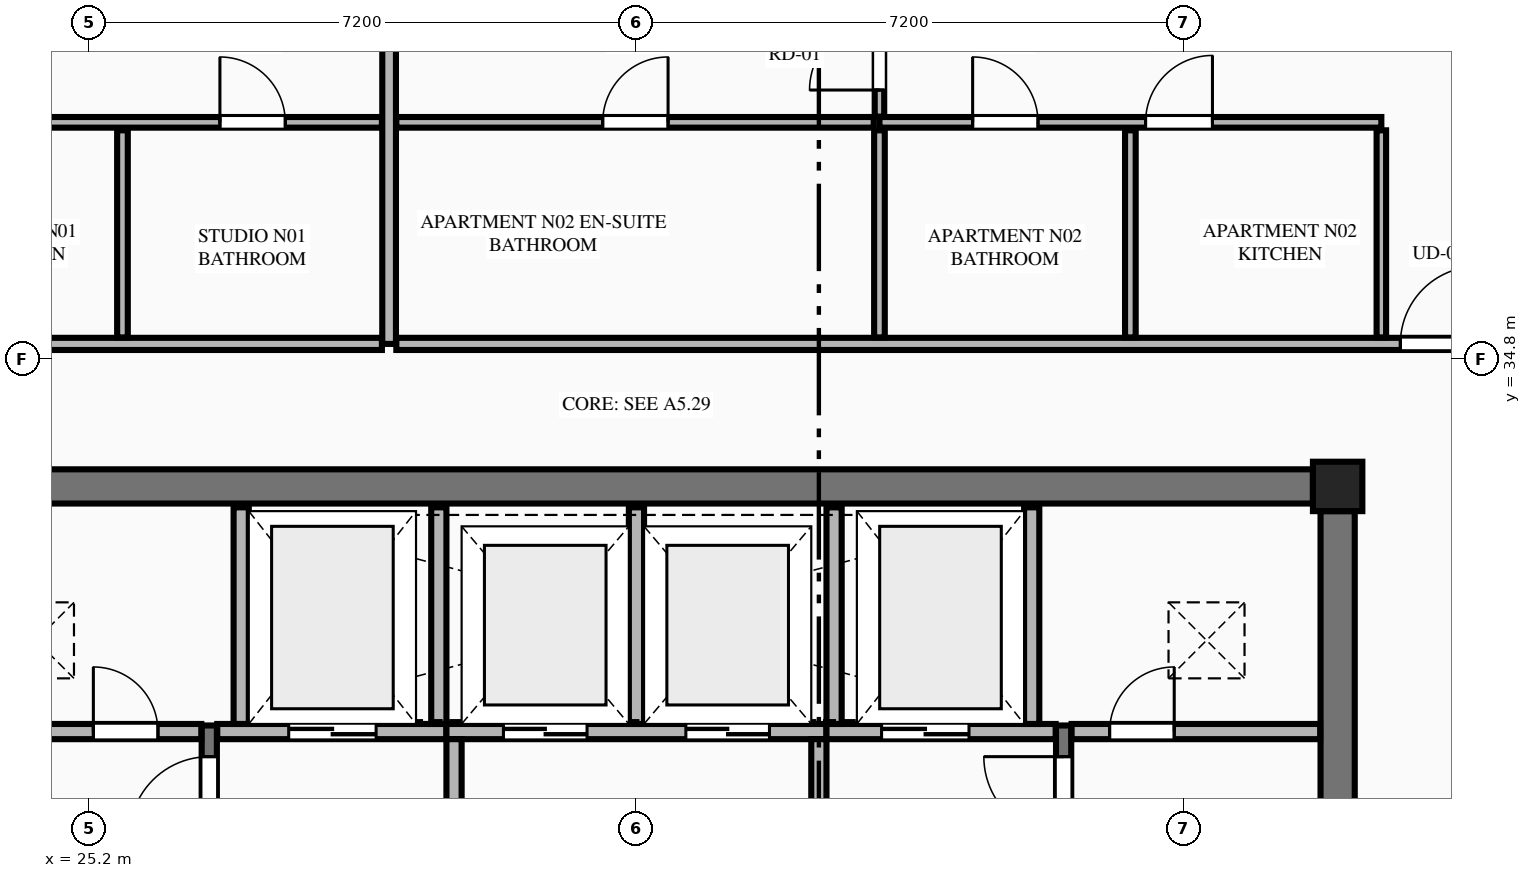
"""IFC4 building model, lengths in metres.
Left out: names, types, materials, properties, quantities, classifications, styles, units other than length and angle.
Written with IfcOpenShell. Run it as: python <this file> out.ifc"""

import sys

from ifc_helpers import new_model, si_unit, direction, frame, frame_2d, origin, origin_2d, place, context, subcontext, project, spatial, rectangle, extrude, element, fill, save


model = new_model("IFC4")
c1 = context("Model", 3, precision=1e-05, world=origin(), true_north=direction((0.0, 1.0)))
c2 = subcontext(c1, "Body", "Model", "MODEL_VIEW")
j1 = project(units=[si_unit("LENGTHUNIT", "METRE"), si_unit("PLANEANGLEUNIT", "RADIAN")], contexts=[c1])
p1 = place(None, origin())
s1 = spatial("IfcSite", under=j1, at=p1, CompositionType="ELEMENT")
p2 = place(p1, origin())
s2 = spatial("IfcBuilding", under=s1, at=p2, CompositionType="ELEMENT")
p3 = place(p2, frame((0.0, 0.0, 287.5)))
s3 = spatial("IfcBuildingStorey", under=s2, at=p3, CompositionType="ELEMENT", Elevation=287.5)
p4 = place(p3, frame((41.625, 33.125, 0.0), z_axis=(0.0, 0.0, 1.0), x_axis=(1.0, 0.0, 0.0)))
e1 = element("IfcColumn", 1, at=p4, inside=s3, PredefinedType="COLUMN", context=c2, shape_type="SweptSolid", body=[
    extrude(rectangle(XDim=0.65, YDim=0.65, at=origin_2d()), origin(), (0.0, 0.0, 1.0), 4.0),
])
p5 = place(p3, frame((23.5, 33.125, 0.0), z_axis=(0.0, 0.0, 1.0), x_axis=(1.0, 0.0, 0.0)))
e2 = element("IfcWall", 2, at=p5, inside=s3, PredefinedType="SHEAR", context=c2, shape_type="SweptSolid", body=[
    extrude(rectangle(XDim=17.8, YDim=0.45, at=frame_2d((8.9, 0.0))), origin(), (0.0, 0.0, 1.0), 3.8),
])
p6 = place(p3, frame((41.625, 19.0, 0.0), z_axis=(0.0, 0.0, 1.0), x_axis=(0.0, 1.0, 0.0)))
e3 = element("IfcWall", 3, at=p6, inside=s3, PredefinedType="SHEAR", context=c2, shape_type="SweptSolid", body=[
    extrude(rectangle(XDim=13.8, YDim=0.45, at=frame_2d((6.9, 0.0))), origin(), (0.0, 0.0, 1.0), 3.8),
])
p7 = place(p6, frame((2.84, 0.0, 0.0)))
e4 = element("IfcOpeningElement", 4, at=p7, cuts=e3, PredefinedType="OPENING", context=c2, shape_type="SweptSolid", body=[
    extrude(rectangle(XDim=1.22, YDim=2.25, at=frame_2d((0.61, 1.125))), frame((0.0, 0.235, 0.0), z_axis=(0.0, -1.0, 0.0), x_axis=(1.0, 0.0, 0.0)), (0.0, 0.0, 1.0), 0.47),
])
p8 = place(p3, frame((26.78, 23.2, 0.0), z_axis=(0.0, 0.0, 1.0), x_axis=(0.0, 1.0, 0.0)))
e5 = element("IfcWall", 5, at=p8, inside=s3, PredefinedType="SHEAR", context=c2, shape_type="SweptSolid", body=[
    extrude(rectangle(XDim=6.78, YDim=0.2, at=frame_2d((3.39, 0.0))), origin(), (0.0, 0.0, 1.0), 4.0),
])
p9 = place(p8, frame((5.32, 0.0, 0.0)))
e6 = element("IfcOpeningElement", 6, at=p9, cuts=e5, PredefinedType="OPENING", context=c2, shape_type="SweptSolid", body=[
    extrude(rectangle(XDim=1.05, YDim=2.15, at=frame_2d((0.525, 1.075))), frame((0.0, 0.11, 0.0), z_axis=(0.0, -1.0, 0.0), x_axis=(1.0, 0.0, 0.0)), (0.0, 0.0, 1.0), 0.22),
])
p10 = place(p3, frame((38.02, 23.2, 0.0), z_axis=(0.0, 0.0, 1.0), x_axis=(0.0, 1.0, 0.0)))
e7 = element("IfcWall", 7, at=p10, inside=s3, PredefinedType="SHEAR", context=c2, shape_type="SweptSolid", body=[
    extrude(rectangle(XDim=6.78, YDim=0.2, at=frame_2d((3.39, 0.0))), origin(), (0.0, 0.0, 1.0), 4.0),
])
p11 = place(p10, frame((5.32, 0.0, 0.0)))
e8 = element("IfcOpeningElement", 8, at=p11, cuts=e7, PredefinedType="OPENING", context=c2, shape_type="SweptSolid", body=[
    extrude(rectangle(XDim=1.05, YDim=2.15, at=frame_2d((0.525, 1.075))), frame((0.0, 0.11, 0.0), z_axis=(0.0, -1.0, 0.0), x_axis=(1.0, 0.0, 0.0)), (0.0, 0.0, 1.0), 0.22),
])
p12 = place(p3, frame((23.405, 29.9, 0.0), z_axis=(0.0, 0.0, 1.0), x_axis=(1.0, 0.0, 0.0)))
e9 = element("IfcWall", 9, at=p12, inside=s3, PredefinedType="PLUMBINGWALL", context=c2, shape_type="SweptSolid", body=[
    extrude(rectangle(XDim=3.27, YDim=0.2, at=frame_2d((1.635, 0.0))), origin(), (0.0, 0.0, 1.0), 3.8),
])
p13 = place(p12, frame((1.85, 0.0, 0.0)))
e10 = element("IfcOpeningElement", 10, at=p13, cuts=e9, PredefinedType="OPENING", context=c2, shape_type="SweptSolid", body=[
    extrude(rectangle(XDim=0.85, YDim=2.05, at=frame_2d((0.425, 1.025))), frame((0.0, 0.11, 0.0), z_axis=(0.0, -1.0, 0.0), x_axis=(1.0, 0.0, 0.0)), (0.0, 0.0, 1.0), 0.22),
])
p14 = place(p3, frame((26.885, 29.9, 0.0), z_axis=(0.0, 0.0, 1.0), x_axis=(1.0, 0.0, 0.0)))
e11 = element("IfcWall", 11, at=p14, inside=s3, PredefinedType="PLUMBINGWALL", context=c2, shape_type="SweptSolid", body=[
    extrude(rectangle(XDim=3.015, YDim=0.2, at=frame_2d((1.507, 0.0))), origin(), (0.0, 0.0, 1.0), 3.8),
])
p15 = place(p14, frame((0.94, 0.0, 0.0)))
e12 = element("IfcOpeningElement", 12, at=p15, cuts=e11, PredefinedType="OPENING", context=c2, shape_type="SweptSolid", body=[
    extrude(rectangle(XDim=1.15, YDim=2.2, at=frame_2d((0.575, 1.1))), frame((0.0, 0.11, 0.0), z_axis=(0.0, -1.0, 0.0), x_axis=(1.0, 0.0, 0.0)), (0.0, 0.0, 1.0), 0.22),
])
p16 = place(p3, frame((29.9, 29.9, 0.0), z_axis=(0.0, 0.0, 1.0), x_axis=(1.0, 0.0, 0.0)))
e13 = element("IfcWall", 13, at=p16, inside=s3, PredefinedType="PLUMBINGWALL", context=c2, shape_type="SweptSolid", body=[
    extrude(rectangle(XDim=5.0, YDim=0.2, at=frame_2d((2.5, 0.0))), origin(), (0.0, 0.0, 1.0), 3.8),
])
p17 = place(p16, frame((0.75, 0.0, 0.0)))
e14 = element("IfcOpeningElement", 14, at=p17, cuts=e13, PredefinedType="OPENING", context=c2, shape_type="SweptSolid", body=[
    extrude(rectangle(XDim=1.1, YDim=2.2, at=frame_2d((0.55, 1.1))), frame((0.0, 0.11, 0.0), z_axis=(0.0, -1.0, 0.0), x_axis=(1.0, 0.0, 0.0)), (0.0, 0.0, 1.0), 0.22),
])
p18 = place(p16, frame((3.15, 0.0, 0.0)))
e15 = element("IfcOpeningElement", 15, at=p18, cuts=e13, PredefinedType="OPENING", context=c2, shape_type="SweptSolid", body=[
    extrude(rectangle(XDim=1.1, YDim=2.2, at=frame_2d((0.55, 1.1))), frame((0.0, 0.11, 0.0), z_axis=(0.0, -1.0, 0.0), x_axis=(1.0, 0.0, 0.0)), (0.0, 0.0, 1.0), 0.22),
])
p19 = place(p3, frame((34.9, 29.9, 0.0), z_axis=(0.0, 0.0, 1.0), x_axis=(1.0, 0.0, 0.0)))
e16 = element("IfcWall", 16, at=p19, inside=s3, PredefinedType="PLUMBINGWALL", context=c2, shape_type="SweptSolid", body=[
    extrude(rectangle(XDim=3.015, YDim=0.2, at=frame_2d((1.508, 0.0))), origin(), (0.0, 0.0, 1.0), 3.8),
])
p20 = place(p19, frame((0.725, 0.0, 0.0)))
e17 = element("IfcOpeningElement", 17, at=p20, cuts=e16, PredefinedType="OPENING", context=c2, shape_type="SweptSolid", body=[
    extrude(rectangle(XDim=1.15, YDim=2.2, at=frame_2d((0.575, 1.1))), frame((0.0, 0.11, 0.0), z_axis=(0.0, -1.0, 0.0), x_axis=(1.0, 0.0, 0.0)), (0.0, 0.0, 1.0), 0.22),
])
p21 = place(p3, frame((38.125, 29.9, 0.0), z_axis=(0.0, 0.0, 1.0), x_axis=(1.0, 0.0, 0.0)))
e18 = element("IfcWall", 18, at=p21, inside=s3, PredefinedType="PLUMBINGWALL", context=c2, shape_type="SweptSolid", body=[
    extrude(rectangle(XDim=3.27, YDim=0.2, at=frame_2d((1.635, 0.0))), origin(), (0.0, 0.0, 1.0), 3.8),
])
p22 = place(p21, frame((0.5, 0.0, 0.0)))
e19 = element("IfcOpeningElement", 19, at=p22, cuts=e18, PredefinedType="OPENING", context=c2, shape_type="SweptSolid", body=[
    extrude(rectangle(XDim=0.85, YDim=2.05, at=frame_2d((0.425, 1.025))), frame((0.0, 0.11, 0.0), z_axis=(0.0, -1.0, 0.0), x_axis=(1.0, 0.0, 0.0)), (0.0, 0.0, 1.0), 0.22),
])
for number, where, z_axis, x_axis in (
    (20, (27.2, 30.0, 0.0), (0.0, 0.0, 1.0), (0.0, 1.0, 0.0)),
    (21, (29.8, 30.0, 0.0), (0.0, 0.0, 1.0), (0.0, 1.0, 0.0)),
    (22, (32.4, 30.0, 0.0), (0.0, 0.0, 1.0), (0.0, 1.0, 0.0)),
    (23, (35.0, 30.0, 0.0), (0.0, 0.0, 1.0), (0.0, 1.0, 0.0)),
    (24, (37.6, 30.0, 0.0), (0.0, 0.0, 1.0), (0.0, 1.0, 0.0)),
):
    element("IfcWall", number, at=place(p3, frame(where, z_axis=z_axis, x_axis=x_axis)), inside=s3, PredefinedType="PLUMBINGWALL", context=c2, shape_type="SweptSolid", body=[
        extrude(rectangle(XDim=2.85, YDim=0.2, at=frame_2d((1.425, 0.0))), origin(), (0.0, 0.0, 1.0), 3.8),
    ])
p23 = place(p3, frame((30.0, 27.05, 0.0), z_axis=(0.0, 0.0, 1.0), x_axis=(0.0, 1.0, 0.0)))
e25 = element("IfcWall", 25, at=p23, inside=s3, PredefinedType="PLUMBINGWALL", context=c2, shape_type="SweptSolid", body=[
    extrude(rectangle(XDim=2.75, YDim=0.2, at=frame_2d((1.375, 0.0))), origin(), (0.0, 0.0, 1.0), 3.8),
])
p24 = place(p23, frame((0.85, 0.0, 0.0)))
e26 = element("IfcOpeningElement", 26, at=p24, cuts=e25, PredefinedType="OPENING", context=c2, shape_type="SweptSolid", body=[
    extrude(rectangle(XDim=1.0, YDim=2.15, at=frame_2d((0.5, 1.075))), frame((0.0, 0.11, 0.0), z_axis=(0.0, -1.0, 0.0), x_axis=(1.0, 0.0, 0.0)), (0.0, 0.0, 1.0), 0.22),
])
p25 = place(p3, frame((34.8, 27.05, 0.0), z_axis=(0.0, 0.0, 1.0), x_axis=(0.0, 1.0, 0.0)))
e27 = element("IfcWall", 27, at=p25, inside=s3, PredefinedType="PLUMBINGWALL", context=c2, shape_type="SweptSolid", body=[
    extrude(rectangle(XDim=2.75, YDim=0.2, at=frame_2d((1.375, 0.0))), origin(), (0.0, 0.0, 1.0), 3.8),
])
p26 = place(p25, frame((0.85, 0.0, 0.0)))
e28 = element("IfcOpeningElement", 28, at=p26, cuts=e27, PredefinedType="OPENING", context=c2, shape_type="SweptSolid", body=[
    extrude(rectangle(XDim=1.0, YDim=2.15, at=frame_2d((0.5, 1.075))), frame((0.0, 0.11, 0.0), z_axis=(0.0, -1.0, 0.0), x_axis=(1.0, 0.0, 0.0)), (0.0, 0.0, 1.0), 0.22),
])
p27 = place(p3, frame((29.146, 35.0, 0.0), z_axis=(0.0, 0.0, 1.0), x_axis=(0.0, 1.0, 0.0)))
e29 = element("IfcWall", 29, at=p27, inside=s3, PredefinedType="PARTITIONING", context=c2, shape_type="SweptSolid", body=[
    extrude(rectangle(XDim=9.195, YDim=0.18, at=frame_2d((4.598, 0.0))), origin(), (0.0, 0.0, 1.0), 3.257),
])
p28 = place(p3, frame((20.445, 35.0, 0.0), z_axis=(0.0, 0.0, 1.0), x_axis=(1.0, 0.0, 0.0)))
e30 = element("IfcWall", 30, at=p28, inside=s3, PredefinedType="PARTITIONING", context=c2, shape_type="SweptSolid", body=[
    extrude(rectangle(XDim=8.606, YDim=0.16, at=frame_2d((4.303, 0.0))), origin(), (0.0, 0.0, 1.0), 3.8),
])
p29 = place(p28, frame((0.405, 0.0, 0.0)))
e31 = element("IfcOpeningElement", 31, at=p29, cuts=e30, PredefinedType="OPENING", context=c2, shape_type="SweptSolid", body=[
    extrude(rectangle(XDim=1.02, YDim=2.25, at=frame_2d((0.51, 1.125))), frame((0.0, 0.09, 0.0), z_axis=(0.0, -1.0, 0.0), x_axis=(1.0, 0.0, 0.0)), (0.0, 0.0, 1.0), 0.18),
])
p30 = place(p3, frame((22.4, 37.915, 0.0), z_axis=(0.0, 0.0, 1.0), x_axis=(1.0, 0.0, 0.0)))
e32 = element("IfcWall", 32, at=p30, inside=s3, PredefinedType="PLUMBINGWALL", context=c2, shape_type="SweptSolid", body=[
    extrude(rectangle(XDim=6.651, YDim=0.14, at=frame_2d((3.326, 0.0))), origin(), (0.0, 0.0, 1.0), 3.8),
])
p31 = place(p30, frame((4.52, 0.0, 0.0)))
e33 = element("IfcOpeningElement", 33, at=p31, cuts=e32, PredefinedType="OPENING", context=c2, shape_type="SweptSolid", body=[
    extrude(rectangle(XDim=0.86, YDim=2.1, at=frame_2d((0.43, 1.05))), frame((0.0, 0.08, 0.0), z_axis=(0.0, -1.0, 0.0), x_axis=(1.0, 0.0, 0.0)), (0.0, 0.0, 1.0), 0.16),
])
p32 = place(p30, frame((0.22, 0.0, 0.0)))
e34 = element("IfcOpeningElement", 34, at=p32, cuts=e32, PredefinedType="OPENING", context=c2, shape_type="SweptSolid", body=[
    extrude(rectangle(XDim=0.88, YDim=2.15, at=frame_2d((0.44, 1.075))), frame((0.0, 0.08, 0.0), z_axis=(0.0, -1.0, 0.0), x_axis=(1.0, 0.0, 0.0)), (0.0, 0.0, 1.0), 0.16),
])
p33 = place(p3, frame((25.638, 35.085, 0.0), z_axis=(0.0, 0.0, 1.0), x_axis=(0.0, 1.0, 0.0)))
e35 = element("IfcWall", 35, at=p33, inside=s3, PredefinedType="PLUMBINGWALL", context=c2, shape_type="SweptSolid", body=[
    extrude(rectangle(XDim=2.725, YDim=0.14, at=frame_2d((1.363, 0.0))), origin(), (0.0, 0.0, 1.0), 3.8),
])
p34 = place(p3, frame((29.241, 35.0, 0.0), z_axis=(0.0, 0.0, 1.0), x_axis=(1.0, 0.0, 0.0)))
e36 = element("IfcWall", 36, at=p34, inside=s3, PredefinedType="PARTITIONING", context=c2, shape_type="SweptSolid", body=[
    extrude(rectangle(XDim=15.114, YDim=0.16, at=frame_2d((7.557, 0.0))), origin(), (0.0, 0.0, 1.0), 3.8),
])
p35 = place(p34, frame((13.209, 0.0, 0.0)))
e37 = element("IfcOpeningElement", 37, at=p35, cuts=e36, PredefinedType="OPENING", context=c2, shape_type="SweptSolid", body=[
    extrude(rectangle(XDim=1.02, YDim=2.25, at=frame_2d((0.51, 1.125))), frame((0.0, 0.09, 0.0), z_axis=(0.0, -1.0, 0.0), x_axis=(1.0, 0.0, 0.0)), (0.0, 0.0, 1.0), 0.18),
])
p36 = place(p3, frame((42.2, 35.085, 0.0), z_axis=(0.0, 0.0, 1.0), x_axis=(0.0, 1.0, 0.0)))
e38 = element("IfcWall", 38, at=p36, inside=s3, PredefinedType="PARTITIONING", context=c2, shape_type="SweptSolid", body=[
    extrude(rectangle(XDim=2.725, YDim=0.125, at=frame_2d((1.363, 0.0))), origin(), (0.0, 0.0, 1.0), 3.8),
])
p37 = place(p3, frame((35.597, 37.915, 0.0), z_axis=(0.0, 0.0, 1.0), x_axis=(1.0, 0.0, 0.0)))
e39 = element("IfcWall", 39, at=p37, inside=s3, PredefinedType="PLUMBINGWALL", context=c2, shape_type="SweptSolid", body=[
    extrude(rectangle(XDim=6.603, YDim=0.14, at=frame_2d((3.302, 0.0))), origin(), (0.0, 0.0, 1.0), 3.8),
])
p38 = place(p37, frame((1.226, 0.0, 0.0)))
e40 = element("IfcOpeningElement", 40, at=p38, cuts=e39, PredefinedType="OPENING", context=c2, shape_type="SweptSolid", body=[
    extrude(rectangle(XDim=0.86, YDim=2.1, at=frame_2d((0.43, 1.05))), frame((0.0, 0.08, 0.0), z_axis=(0.0, -1.0, 0.0), x_axis=(1.0, 0.0, 0.0)), (0.0, 0.0, 1.0), 0.16),
])
p39 = place(p37, frame((3.501, 0.0, 0.0)))
e41 = element("IfcOpeningElement", 41, at=p39, cuts=e39, PredefinedType="OPENING", context=c2, shape_type="SweptSolid", body=[
    extrude(rectangle(XDim=0.88, YDim=2.15, at=frame_2d((0.44, 1.075))), frame((0.0, 0.08, 0.0), z_axis=(0.0, -1.0, 0.0), x_axis=(1.0, 0.0, 0.0)), (0.0, 0.0, 1.0), 0.16),
])
p40 = place(p3, frame((29.241, 37.915, 0.0), z_axis=(0.0, 0.0, 1.0), x_axis=(1.0, 0.0, 0.0)))
e42 = element("IfcWall", 42, at=p40, inside=s3, PredefinedType="PLUMBINGWALL", context=c2, shape_type="SweptSolid", body=[
    extrude(rectangle(XDim=6.281, YDim=0.14, at=frame_2d((3.141, 0.0))), origin(), (0.0, 0.0, 1.0), 3.8),
])
p41 = place(p40, frame((2.715, 0.0, 0.0)))
e43 = element("IfcOpeningElement", 43, at=p41, cuts=e42, PredefinedType="OPENING", context=c2, shape_type="SweptSolid", body=[
    extrude(rectangle(XDim=0.86, YDim=2.1, at=frame_2d((0.43, 1.05))), frame((0.0, 0.08, 0.0), z_axis=(0.0, -1.0, 0.0), x_axis=(1.0, 0.0, 0.0)), (0.0, 0.0, 1.0), 0.16),
])
p42 = place(p3, frame((38.898, 35.085, 0.0), z_axis=(0.0, 0.0, 1.0), x_axis=(0.0, 1.0, 0.0)))
e44 = element("IfcWall", 44, at=p42, inside=s3, PredefinedType="PLUMBINGWALL", context=c2, shape_type="SweptSolid", body=[
    extrude(rectangle(XDim=2.725, YDim=0.14, at=frame_2d((1.363, 0.0))), origin(), (0.0, 0.0, 1.0), 3.8),
])
p43 = place(p3, frame((35.597, 35.085, 0.0), z_axis=(0.0, 0.0, 1.0), x_axis=(0.0, 1.0, 0.0)))
e45 = element("IfcWall", 45, at=p43, inside=s3, PredefinedType="PLUMBINGWALL", context=c2, shape_type="SweptSolid", body=[
    extrude(rectangle(XDim=2.725, YDim=0.14, at=frame_2d((1.363, 0.0))), origin(), (0.0, 0.0, 1.0), 3.257),
])
p44 = place(p3, frame((35.597, 37.99, 0.0), z_axis=(0.0, 0.0, 1.0), x_axis=(0.0, 1.0, 0.0)))
e46 = element("IfcWall", 46, at=p44, inside=s3, PredefinedType="PARTITIONING", context=c2, shape_type="SweptSolid", body=[
    extrude(rectangle(XDim=6.295, YDim=0.125, at=frame_2d((3.147, 0.0))), origin(), (0.0, 0.0, 1.0), 3.257),
])
p45 = place(p44, frame((0.35, 0.0, 0.0)))
e47 = element("IfcOpeningElement", 47, at=p45, cuts=e46, PredefinedType="OPENING", context=c2, shape_type="SweptSolid", body=[
    extrude(rectangle(XDim=0.92, YDim=2.15, at=frame_2d((0.46, 1.075))), frame((0.0, 0.073, 0.0), z_axis=(0.0, -1.0, 0.0), x_axis=(1.0, 0.0, 0.0)), (0.0, 0.0, 1.0), 0.145),
])
p46 = place(p9, origin())
e48 = element("IfcDoor", 48, at=p46, inside=s3, OperationType="SINGLE_SWING_LEFT", PredefinedType="DOOR", context=c2, shape_type="SweptSolid", body=[
    extrude(rectangle(XDim=1.05, YDim=2.15, at=frame_2d((0.525, 1.075))), frame((0.0, 0.025, 0.0), z_axis=(0.0, -1.0, 0.0), x_axis=(1.0, 0.0, 0.0)), (0.0, 0.0, 1.0), 0.05),
])
fill(e6, e48)
p47 = place(p11, origin())
e49 = element("IfcDoor", 49, at=p47, inside=s3, OperationType="SINGLE_SWING_RIGHT", PredefinedType="DOOR", context=c2, shape_type="SweptSolid", body=[
    extrude(rectangle(XDim=1.05, YDim=2.15, at=frame_2d((0.525, 1.075))), frame((0.0, 0.025, 0.0), z_axis=(0.0, -1.0, 0.0), x_axis=(1.0, 0.0, 0.0)), (0.0, 0.0, 1.0), 0.05),
])
fill(e8, e49)
p48 = place(p13, origin())
e50 = element("IfcDoor", 50, at=p48, inside=s3, OperationType="SINGLE_SWING_LEFT", PredefinedType="DOOR", context=c2, shape_type="SweptSolid", body=[
    extrude(rectangle(XDim=0.85, YDim=2.05, at=frame_2d((0.425, 1.025))), frame((0.0, 0.025, 0.0), z_axis=(0.0, -1.0, 0.0), x_axis=(1.0, 0.0, 0.0)), (0.0, 0.0, 1.0), 0.05),
])
fill(e10, e50)
p49 = place(p22, origin())
e51 = element("IfcDoor", 51, at=p49, inside=s3, OperationType="SINGLE_SWING_RIGHT", PredefinedType="DOOR", context=c2, shape_type="SweptSolid", body=[
    extrude(rectangle(XDim=0.85, YDim=2.05, at=frame_2d((0.425, 1.025))), frame((0.0, 0.025, 0.0), z_axis=(0.0, -1.0, 0.0), x_axis=(1.0, 0.0, 0.0)), (0.0, 0.0, 1.0), 0.05),
])
fill(e19, e51)
p50 = place(p15, origin())
e52 = element("IfcDoor", 52, at=p50, inside=s3, OperationType="DOUBLE_DOOR_SLIDING", PredefinedType="DOOR", context=c2, shape_type="SweptSolid", body=[
    extrude(rectangle(XDim=1.15, YDim=2.2, at=frame_2d((0.575, 1.1))), frame((0.0, 0.025, 0.0), z_axis=(0.0, -1.0, 0.0), x_axis=(1.0, 0.0, 0.0)), (0.0, 0.0, 1.0), 0.05),
])
fill(e12, e52)
p51 = place(p20, origin())
e53 = element("IfcDoor", 53, at=p51, inside=s3, OperationType="DOUBLE_DOOR_SLIDING", PredefinedType="DOOR", context=c2, shape_type="SweptSolid", body=[
    extrude(rectangle(XDim=1.15, YDim=2.2, at=frame_2d((0.575, 1.1))), frame((0.0, 0.025, 0.0), z_axis=(0.0, -1.0, 0.0), x_axis=(1.0, 0.0, 0.0)), (0.0, 0.0, 1.0), 0.05),
])
fill(e17, e53)
p52 = place(p17, origin())
e54 = element("IfcDoor", 54, at=p52, inside=s3, OperationType="DOUBLE_DOOR_SLIDING", PredefinedType="DOOR", context=c2, shape_type="SweptSolid", body=[
    extrude(rectangle(XDim=1.1, YDim=2.2, at=frame_2d((0.55, 1.1))), frame((0.0, 0.025, 0.0), z_axis=(0.0, -1.0, 0.0), x_axis=(1.0, 0.0, 0.0)), (0.0, 0.0, 1.0), 0.05),
])
fill(e14, e54)
p53 = place(p18, origin())
e55 = element("IfcDoor", 55, at=p53, inside=s3, OperationType="DOUBLE_DOOR_SLIDING", PredefinedType="DOOR", context=c2, shape_type="SweptSolid", body=[
    extrude(rectangle(XDim=1.1, YDim=2.2, at=frame_2d((0.55, 1.1))), frame((0.0, 0.025, 0.0), z_axis=(0.0, -1.0, 0.0), x_axis=(1.0, 0.0, 0.0)), (0.0, 0.0, 1.0), 0.05),
])
fill(e15, e55)
p54 = place(p31, origin())
e56 = element("IfcDoor", 56, at=p54, inside=s3, OperationType="SINGLE_SWING_LEFT", PredefinedType="DOOR", context=c2, shape_type="SweptSolid", body=[
    extrude(rectangle(XDim=0.86, YDim=2.1, at=frame_2d((0.43, 1.05))), frame((0.0, 0.025, 0.0), z_axis=(0.0, -1.0, 0.0), x_axis=(1.0, 0.0, 0.0)), (0.0, 0.0, 1.0), 0.05),
])
fill(e33, e56)
p55 = place(p38, origin())
e57 = element("IfcDoor", 57, at=p55, inside=s3, OperationType="SINGLE_SWING_LEFT", PredefinedType="DOOR", context=c2, shape_type="SweptSolid", body=[
    extrude(rectangle(XDim=0.86, YDim=2.1, at=frame_2d((0.43, 1.05))), frame((0.0, 0.025, 0.0), z_axis=(0.0, -1.0, 0.0), x_axis=(1.0, 0.0, 0.0)), (0.0, 0.0, 1.0), 0.05),
])
fill(e40, e57)
p56 = place(p41, origin())
e58 = element("IfcDoor", 58, at=p56, inside=s3, OperationType="SINGLE_SWING_RIGHT", PredefinedType="DOOR", context=c2, shape_type="SweptSolid", body=[
    extrude(rectangle(XDim=0.86, YDim=2.1, at=frame_2d((0.43, 1.05))), frame((0.0, 0.025, 0.0), z_axis=(0.0, -1.0, 0.0), x_axis=(1.0, 0.0, 0.0)), (0.0, 0.0, 1.0), 0.05),
])
fill(e43, e58)
p57 = place(p35, origin())
e59 = element("IfcDoor", 59, at=p57, inside=s3, OperationType="SINGLE_SWING_RIGHT", PredefinedType="DOOR", context=c2, shape_type="SweptSolid", body=[
    extrude(rectangle(XDim=1.02, YDim=2.25, at=frame_2d((0.51, 1.125))), frame((0.0, 0.025, 0.0), z_axis=(0.0, -1.0, 0.0), x_axis=(1.0, 0.0, 0.0)), (0.0, 0.0, 1.0), 0.05),
])
fill(e37, e59)
p58 = place(p39, origin())
e60 = element("IfcDoor", 60, at=p58, inside=s3, OperationType="SINGLE_SWING_RIGHT", PredefinedType="DOOR", context=c2, shape_type="SweptSolid", body=[
    extrude(rectangle(XDim=0.88, YDim=2.15, at=frame_2d((0.44, 1.075))), frame((0.0, 0.025, 0.0), z_axis=(0.0, -1.0, 0.0), x_axis=(1.0, 0.0, 0.0)), (0.0, 0.0, 1.0), 0.05),
])
fill(e41, e60)
p59 = place(p45, origin())
e61 = element("IfcDoor", 61, at=p59, inside=s3, OperationType="SINGLE_SWING_LEFT", PredefinedType="DOOR", context=c2, shape_type="SweptSolid", body=[
    extrude(rectangle(XDim=0.92, YDim=2.15, at=frame_2d((0.46, 1.075))), frame((0.0, 0.025, 0.0), z_axis=(0.0, -1.0, 0.0), x_axis=(1.0, 0.0, 0.0)), (0.0, 0.0, 1.0), 0.05),
])
fill(e47, e61)
save(model, sys.argv[1])
